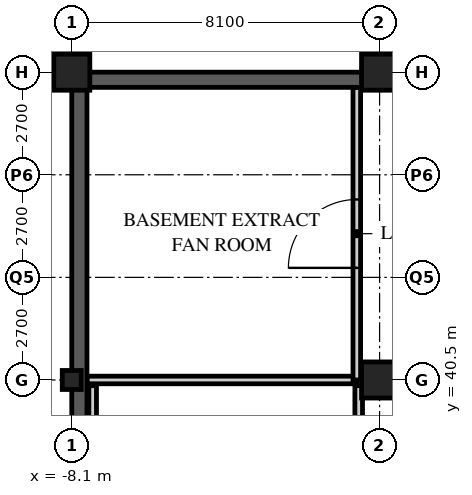
"""IFC4 building model, lengths in metres.
Left out: names, types, materials, properties, quantities, classifications, styles, units other than length and angle.
Written with IfcOpenShell. Run it as: python <this file> out.ifc"""

import sys

from ifc_helpers import new_model, si_unit, direction, frame, frame_2d, origin, origin_2d, place, context, subcontext, project, spatial, rectangle, hollow_rectangle, extrude, element, fill, save


model = new_model("IFC4")
c1 = context("Model", 3, precision=1e-05, world=origin(), true_north=direction((0.0, 1.0)))
c2 = subcontext(c1, "Body", "Model", "MODEL_VIEW")
j1 = project(units=[si_unit("LENGTHUNIT", "METRE"), si_unit("PLANEANGLEUNIT", "RADIAN")], contexts=[c1])
p1 = place(None, origin())
s1 = spatial("IfcSite", under=j1, at=p1, CompositionType="ELEMENT")
p2 = place(p1, origin())
s2 = spatial("IfcBuilding", under=s1, at=p2, CompositionType="ELEMENT")
p3 = place(p2, frame((0.0, 0.0, -4.2)))
s3 = spatial("IfcBuildingStorey", under=s2, at=p3, CompositionType="ELEMENT", Elevation=-4.2)
p4 = place(p3, frame((-8.1, 40.5, 0.0), z_axis=(0.0, 0.0, 1.0), x_axis=(1.0, 0.0, 0.0)))
e1 = element("IfcColumn", 1, at=p4, inside=s3, PredefinedType="COLUMN", context=c2, shape_type="SweptSolid", body=[
    extrude(hollow_rectangle(XDim=0.5, YDim=0.5, WallThickness=0.03, at=origin_2d()), origin(), (0.0, 0.0, 1.0), 4.2),
])
for number, where, z_axis, x_axis in (
    (2, (-8.1, 48.6, 0.0), (0.0, 0.0, 1.0), (1.0, 0.0, 0.0)),
    (3, (0.0, 40.5, 0.0), (0.0, 0.0, 1.0), (1.0, 0.0, 0.0)),
    (4, (0.0, 48.6, 0.0), (0.0, 0.0, 1.0), (1.0, 0.0, 0.0)),
):
    element("IfcColumn", number, at=place(p3, frame(where, z_axis=z_axis, x_axis=x_axis)), inside=s3, PredefinedType="COLUMN", context=c2, shape_type="SweptSolid", body=[
        extrude(hollow_rectangle(XDim=0.95, YDim=0.95, WallThickness=0.1, at=origin_2d()), origin(), (0.0, 0.0, 1.0), 4.2),
    ])
p5 = place(p3, frame((-7.7, 40.5, 0.0), z_axis=(0.0, 0.0, 1.0), x_axis=(1.0, 0.0, 0.0)))
e5 = element("IfcWall", 5, at=p5, inside=s3, PredefinedType="SOLIDWALL", context=c2, shape_type="SweptSolid", body=[
    extrude(rectangle(XDim=7.1, YDim=0.2, at=frame_2d((3.55, 0.0))), origin(), (0.0, 0.0, 1.0), 3.338),
])
p6 = place(p3, frame((-0.6, 40.5, 0.0), z_axis=(0.0, 0.0, 1.0), x_axis=(0.0, 1.0, 0.0)))
e6 = element("IfcWall", 6, at=p6, inside=s3, PredefinedType="SOLIDWALL", context=c2, shape_type="SweptSolid", body=[
    extrude(rectangle(XDim=7.7, YDim=0.2, at=frame_2d((3.85, 0.0))), origin(), (0.0, 0.0, 1.0), 3.95),
])
p7 = place(p6, frame((2.95, 0.0, 0.0)))
e7 = element("IfcOpeningElement", 7, at=p7, cuts=e6, PredefinedType="OPENING", context=c2, shape_type="SweptSolid", body=[
    extrude(rectangle(XDim=1.8, YDim=2.4, at=frame_2d((0.9, 1.2))), frame((0.0, 0.11, 0.0), z_axis=(0.0, -1.0, 0.0), x_axis=(1.0, 0.0, 0.0)), (0.0, 0.0, 1.0), 0.22),
])
p8 = place(p3, frame((64.6, 48.4, 0.0), z_axis=(0.0, 0.0, 1.0), x_axis=(-1.0, 0.0, 0.0)))
e8 = element("IfcWall", 8, at=p8, inside=s3, PredefinedType="SOLIDWALL", context=c2, shape_type="SweptSolid", body=[
    extrude(rectangle(XDim=72.5, YDim=0.4, at=frame_2d((36.25, 0.0))), origin(), (0.0, 0.0, 1.0), 3.338),
])
p9 = place(p3, frame((-7.9, 48.4, 0.0), z_axis=(0.0, 0.0, 1.0), x_axis=(0.0, -1.0, 0.0)))
e9 = element("IfcWall", 9, at=p9, inside=s3, PredefinedType="SOLIDWALL", context=c2, shape_type="SweptSolid", body=[
    extrude(rectangle(XDim=56.3, YDim=0.4, at=frame_2d((28.15, 0.0))), origin(), (0.0, 0.0, 1.0), 3.338),
])
for number, where, z_axis, x_axis in (
    (10, (-0.55, 8.25, 0.0), (0.0, 0.0, 1.0), (0.0, 1.0, 0.0)),
    (11, (-7.55, 8.25, 0.0), (0.0, 0.0, 1.0), (0.0, 1.0, 0.0)),
):
    element("IfcWall", number, at=place(p3, frame(where, z_axis=z_axis, x_axis=x_axis)), inside=s3, PredefinedType="PARTITIONING", context=c2, shape_type="SweptSolid", body=[
        extrude(rectangle(XDim=32.1, YDim=0.2, at=frame_2d((16.05, 0.0))), origin(), (0.0, 0.0, 1.0), 1.1),
    ])
p10 = place(p7, origin())
e12 = element("IfcDoor", 12, at=p10, inside=s3, OperationType="DOUBLE_DOOR_SINGLE_SWING", PredefinedType="DOOR", context=c2, shape_type="SweptSolid", body=[
    extrude(rectangle(XDim=1.8, YDim=2.4, at=frame_2d((0.9, 1.2))), frame((0.0, 0.025, 0.0), z_axis=(0.0, -1.0, 0.0), x_axis=(1.0, 0.0, 0.0)), (0.0, 0.0, 1.0), 0.05),
])
fill(e7, e12)
save(model, sys.argv[1])
